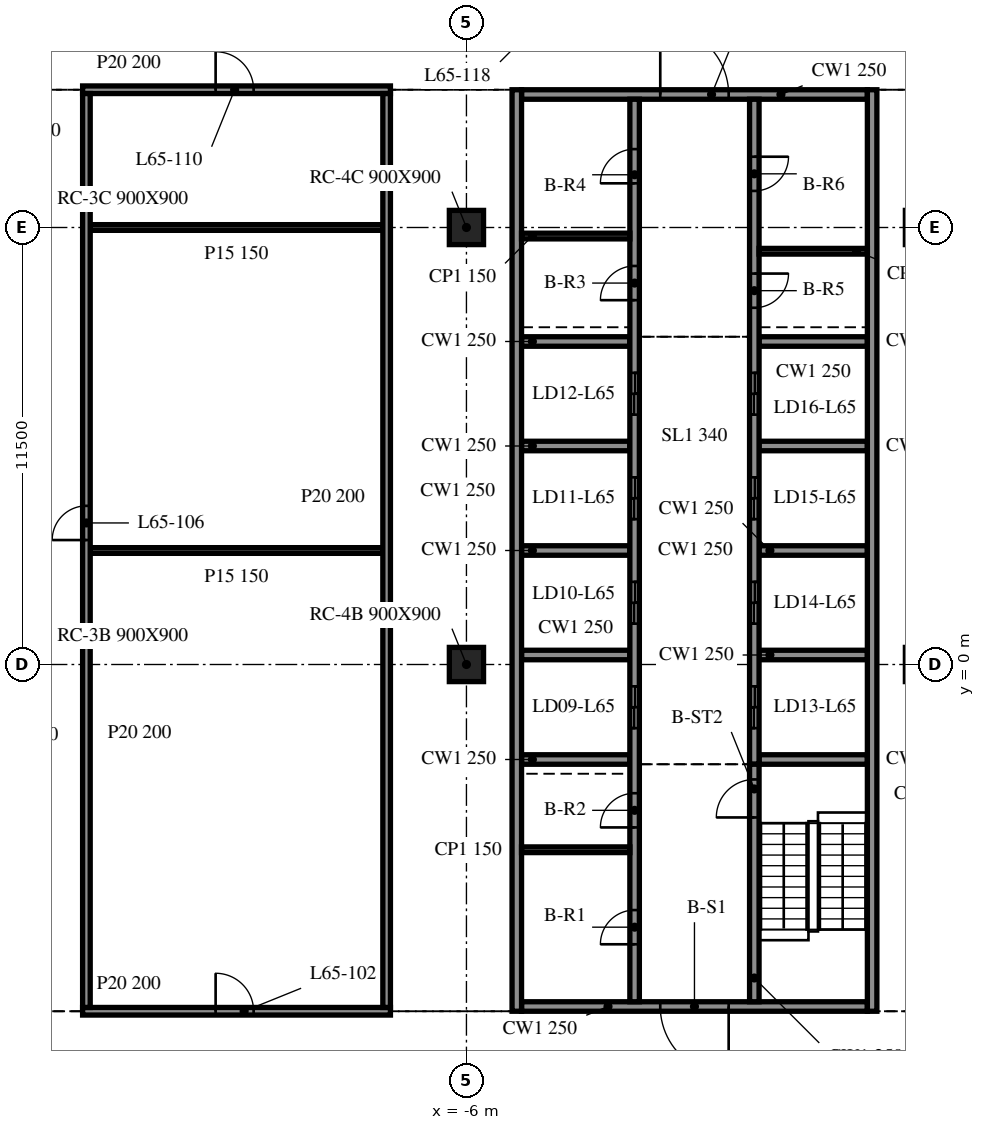
"""IFC4 building model, lengths in metres.
Left out: names, types, materials, properties, quantities, classifications, styles, units other than length and angle.
Written with IfcOpenShell. Run it as: python <this file> out.ifc"""

import sys

from ifc_helpers import new_model, si_unit, direction, frame, frame_2d, origin, origin_2d, place, context, subcontext, project, spatial, rectangle, extrude, element, fill, save


model = new_model("IFC4")
c1 = context("Model", 3, precision=1e-05, world=origin(), true_north=direction((0.0, 1.0)))
c2 = subcontext(c1, "Body", "Model", "MODEL_VIEW")
j1 = project(units=[si_unit("LENGTHUNIT", "METRE"), si_unit("PLANEANGLEUNIT", "RADIAN")], contexts=[c1])
p1 = place(None, origin())
s1 = spatial("IfcSite", under=j1, at=p1, CompositionType="ELEMENT")
p2 = place(p1, origin())
s2 = spatial("IfcBuilding", under=s1, at=p2, CompositionType="ELEMENT")
p3 = place(p2, frame((0.0, 0.0, 267.1)))
s3 = spatial("IfcBuildingStorey", under=s2, at=p3, CompositionType="ELEMENT", Elevation=267.1)
for number, where, z_axis, x_axis in (
    (1, (-6.0, 0.0, -0.34), (0.0, 0.0, 1.0), (1.0, 0.0, 0.0)),
    (2, (-6.0, 11.5, -0.34), (0.0, 0.0, 1.0), (1.0, 0.0, 0.0)),
):
    element("IfcColumn", number, at=place(p3, frame(where, z_axis=z_axis, x_axis=x_axis)), inside=s3, PredefinedType="COLUMN", context=c2, shape_type="SweptSolid", body=[
        extrude(rectangle(XDim=0.9, YDim=0.9, at=origin_2d()), origin(), (0.0, 0.0, 1.0), 3.8),
    ])
for number, where, z_axis, x_axis in (
    (3, (-4.675, 15.125, 0.0), (0.0, 0.0, 1.0), (0.0, -1.0, 0.0)),
    (4, (4.675, -9.125, 0.0), (0.0, 0.0, 1.0), (0.0, 1.0, 0.0)),
):
    element("IfcWall", number, at=place(p3, frame(where, z_axis=z_axis, x_axis=x_axis)), inside=s3, PredefinedType="SOLIDWALL", context=c2, shape_type="SweptSolid", body=[
        extrude(rectangle(XDim=24.25, YDim=0.25, at=frame_2d((12.125, 0.0))), origin(), (0.0, 0.0, 1.0), 3.46),
    ])
p4 = place(p3, frame((4.55, -9.0, 0.0), z_axis=(0.0, 0.0, 1.0), x_axis=(-1.0, 0.0, 0.0)))
e5 = element("IfcWall", 5, at=p4, inside=s3, PredefinedType="SOLIDWALL", context=c2, shape_type="SweptSolid", body=[
    extrude(rectangle(XDim=9.1, YDim=0.25, at=frame_2d((4.55, 0.0))), origin(), (0.0, 0.0, 1.0), 3.46),
])
p5 = place(p4, frame((3.65, 0.0, 0.0)))
e6 = element("IfcOpeningElement", 6, at=p5, cuts=e5, PredefinedType="OPENING", context=c2, shape_type="SweptSolid", body=[
    extrude(rectangle(XDim=1.8, YDim=2.1, at=frame_2d((0.9, 1.05))), frame((0.0, 0.135, 0.0), z_axis=(0.0, -1.0, 0.0), x_axis=(1.0, 0.0, 0.0)), (0.0, 0.0, 1.0), 0.27),
])
p6 = place(p3, frame((-4.55, 15.0, 0.0), z_axis=(0.0, 0.0, 1.0), x_axis=(1.0, 0.0, 0.0)))
e7 = element("IfcWall", 7, at=p6, inside=s3, PredefinedType="SOLIDWALL", context=c2, shape_type="SweptSolid", body=[
    extrude(rectangle(XDim=9.1, YDim=0.25, at=frame_2d((4.55, 0.0))), origin(), (0.0, 0.0, 1.0), 3.46),
])
p7 = place(p6, frame((3.65, 0.0, 0.0)))
e8 = element("IfcOpeningElement", 8, at=p7, cuts=e7, PredefinedType="OPENING", context=c2, shape_type="SweptSolid", body=[
    extrude(rectangle(XDim=1.8, YDim=2.1, at=frame_2d((0.9, 1.05))), frame((0.0, 0.135, 0.0), z_axis=(0.0, -1.0, 0.0), x_axis=(1.0, 0.0, 0.0)), (0.0, 0.0, 1.0), 0.27),
])
p8 = place(p3, frame((-1.575, -8.875, 0.0), z_axis=(0.0, 0.0, 1.0), x_axis=(0.0, 1.0, 0.0)))
e9 = element("IfcWall", 9, at=p8, inside=s3, PredefinedType="SOLIDWALL", context=c2, shape_type="SweptSolid", body=[
    extrude(rectangle(XDim=23.75, YDim=0.25, at=frame_2d((11.875, 0.0))), origin(), (0.0, 0.0, 1.0), 3.46),
])
p9 = place(p8, frame((7.2, 0.0, 0.0)))
e10 = element("IfcOpeningElement", 10, at=p9, cuts=e9, PredefinedType="OPENING", context=c2, shape_type="SweptSolid", body=[
    extrude(rectangle(XDim=1.1, YDim=2.1, at=frame_2d((0.55, 1.05))), frame((0.0, 0.135, 0.0), z_axis=(0.0, -1.0, 0.0), x_axis=(1.0, 0.0, 0.0)), (0.0, 0.0, 1.0), 0.27),
])
p10 = place(p8, frame((9.95, 0.0, 0.0)))
e11 = element("IfcOpeningElement", 11, at=p10, cuts=e9, PredefinedType="OPENING", context=c2, shape_type="SweptSolid", body=[
    extrude(rectangle(XDim=1.1, YDim=2.1, at=frame_2d((0.55, 1.05))), frame((0.0, 0.135, 0.0), z_axis=(0.0, -1.0, 0.0), x_axis=(1.0, 0.0, 0.0)), (0.0, 0.0, 1.0), 0.27),
])
p11 = place(p8, frame((12.7, 0.0, 0.0)))
e12 = element("IfcOpeningElement", 12, at=p11, cuts=e9, PredefinedType="OPENING", context=c2, shape_type="SweptSolid", body=[
    extrude(rectangle(XDim=1.1, YDim=2.1, at=frame_2d((0.55, 1.05))), frame((0.0, 0.135, 0.0), z_axis=(0.0, -1.0, 0.0), x_axis=(1.0, 0.0, 0.0)), (0.0, 0.0, 1.0), 0.27),
])
p12 = place(p8, frame((15.45, 0.0, 0.0)))
e13 = element("IfcOpeningElement", 13, at=p12, cuts=e9, PredefinedType="OPENING", context=c2, shape_type="SweptSolid", body=[
    extrude(rectangle(XDim=1.1, YDim=2.1, at=frame_2d((0.55, 1.05))), frame((0.0, 0.135, 0.0), z_axis=(0.0, -1.0, 0.0), x_axis=(1.0, 0.0, 0.0)), (0.0, 0.0, 1.0), 0.27),
])
p13 = place(p8, frame((1.512, 0.0, 0.0)))
e14 = element("IfcOpeningElement", 14, at=p13, cuts=e9, PredefinedType="OPENING", context=c2, shape_type="SweptSolid", body=[
    extrude(rectangle(XDim=0.9, YDim=2.1, at=frame_2d((0.45, 1.05))), frame((0.0, 0.135, 0.0), z_axis=(0.0, -1.0, 0.0), x_axis=(1.0, 0.0, 0.0)), (0.0, 0.0, 1.0), 0.27),
])
p14 = place(p8, frame((4.587, 0.0, 0.0)))
e15 = element("IfcOpeningElement", 15, at=p14, cuts=e9, PredefinedType="OPENING", context=c2, shape_type="SweptSolid", body=[
    extrude(rectangle(XDim=0.9, YDim=2.1, at=frame_2d((0.45, 1.05))), frame((0.0, 0.135, 0.0), z_axis=(0.0, -1.0, 0.0), x_axis=(1.0, 0.0, 0.0)), (0.0, 0.0, 1.0), 0.27),
])
p15 = place(p8, frame((18.462, 0.0, 0.0)))
e16 = element("IfcOpeningElement", 16, at=p15, cuts=e9, PredefinedType="OPENING", context=c2, shape_type="SweptSolid", body=[
    extrude(rectangle(XDim=0.9, YDim=2.1, at=frame_2d((0.45, 1.05))), frame((0.0, 0.135, 0.0), z_axis=(0.0, -1.0, 0.0), x_axis=(1.0, 0.0, 0.0)), (0.0, 0.0, 1.0), 0.27),
])
p16 = place(p8, frame((21.538, 0.0, 0.0)))
e17 = element("IfcOpeningElement", 17, at=p16, cuts=e9, PredefinedType="OPENING", context=c2, shape_type="SweptSolid", body=[
    extrude(rectangle(XDim=0.9, YDim=2.1, at=frame_2d((0.45, 1.05))), frame((0.0, 0.135, 0.0), z_axis=(0.0, -1.0, 0.0), x_axis=(1.0, 0.0, 0.0)), (0.0, 0.0, 1.0), 0.27),
])
p17 = place(p3, frame((1.575, -8.875, 0.0), z_axis=(0.0, 0.0, 1.0), x_axis=(0.0, 1.0, 0.0)))
e18 = element("IfcWall", 18, at=p17, inside=s3, PredefinedType="SOLIDWALL", context=c2, shape_type="SweptSolid", body=[
    extrude(rectangle(XDim=6.25, YDim=0.25, at=frame_2d((3.125, 0.0))), origin(), (0.0, 0.0, 1.0), 3.46),
])
p18 = place(p17, frame((4.85, 0.0, 0.0)))
e19 = element("IfcOpeningElement", 19, at=p18, cuts=e18, PredefinedType="OPENING", context=c2, shape_type="SweptSolid", body=[
    extrude(rectangle(XDim=1.0, YDim=2.1, at=frame_2d((0.5, 1.05))), frame((0.0, 0.135, 0.0), z_axis=(0.0, -1.0, 0.0), x_axis=(1.0, 0.0, 0.0)), (0.0, 0.0, 1.0), 0.27),
])
p19 = place(p3, frame((1.575, 14.875, 0.0), z_axis=(0.0, 0.0, 1.0), x_axis=(0.0, -1.0, 0.0)))
e20 = element("IfcWall", 20, at=p19, inside=s3, PredefinedType="SOLIDWALL", context=c2, shape_type="SweptSolid", body=[
    extrude(rectangle(XDim=17.5, YDim=0.25, at=frame_2d((8.75, 0.0))), origin(), (0.0, 0.0, 1.0), 3.46),
])
p20 = place(p19, frame((15.45, 0.0, 0.0)))
e21 = element("IfcOpeningElement", 21, at=p20, cuts=e20, PredefinedType="OPENING", context=c2, shape_type="SweptSolid", body=[
    extrude(rectangle(XDim=1.1, YDim=2.1, at=frame_2d((0.55, 1.05))), frame((0.0, 0.135, 0.0), z_axis=(0.0, -1.0, 0.0), x_axis=(1.0, 0.0, 0.0)), (0.0, 0.0, 1.0), 0.27),
])
p21 = place(p19, frame((12.7, 0.0, 0.0)))
e22 = element("IfcOpeningElement", 22, at=p21, cuts=e20, PredefinedType="OPENING", context=c2, shape_type="SweptSolid", body=[
    extrude(rectangle(XDim=1.1, YDim=2.1, at=frame_2d((0.55, 1.05))), frame((0.0, 0.135, 0.0), z_axis=(0.0, -1.0, 0.0), x_axis=(1.0, 0.0, 0.0)), (0.0, 0.0, 1.0), 0.27),
])
p22 = place(p19, frame((9.95, 0.0, 0.0)))
e23 = element("IfcOpeningElement", 23, at=p22, cuts=e20, PredefinedType="OPENING", context=c2, shape_type="SweptSolid", body=[
    extrude(rectangle(XDim=1.1, YDim=2.1, at=frame_2d((0.55, 1.05))), frame((0.0, 0.135, 0.0), z_axis=(0.0, -1.0, 0.0), x_axis=(1.0, 0.0, 0.0)), (0.0, 0.0, 1.0), 0.27),
])
p23 = place(p19, frame((7.2, 0.0, 0.0)))
e24 = element("IfcOpeningElement", 24, at=p23, cuts=e20, PredefinedType="OPENING", context=c2, shape_type="SweptSolid", body=[
    extrude(rectangle(XDim=1.1, YDim=2.1, at=frame_2d((0.55, 1.05))), frame((0.0, 0.135, 0.0), z_axis=(0.0, -1.0, 0.0), x_axis=(1.0, 0.0, 0.0)), (0.0, 0.0, 1.0), 0.27),
])
p24 = place(p19, frame((4.587, 0.0, 0.0)))
e25 = element("IfcOpeningElement", 25, at=p24, cuts=e20, PredefinedType="OPENING", context=c2, shape_type="SweptSolid", body=[
    extrude(rectangle(XDim=0.9, YDim=2.1, at=frame_2d((0.45, 1.05))), frame((0.0, 0.135, 0.0), z_axis=(0.0, -1.0, 0.0), x_axis=(1.0, 0.0, 0.0)), (0.0, 0.0, 1.0), 0.27),
])
p25 = place(p19, frame((1.512, 0.0, 0.0)))
e26 = element("IfcOpeningElement", 26, at=p25, cuts=e20, PredefinedType="OPENING", context=c2, shape_type="SweptSolid", body=[
    extrude(rectangle(XDim=0.9, YDim=2.1, at=frame_2d((0.45, 1.05))), frame((0.0, 0.135, 0.0), z_axis=(0.0, -1.0, 0.0), x_axis=(1.0, 0.0, 0.0)), (0.0, 0.0, 1.0), 0.27),
])
for number, where, z_axis, x_axis in (
    (27, (-4.55, -2.5, 0.0), (0.0, 0.0, 1.0), (1.0, 0.0, 0.0)),
    (28, (-4.55, 0.25, 0.0), (0.0, 0.0, 1.0), (1.0, 0.0, 0.0)),
    (29, (-4.55, 3.0, 0.0), (0.0, 0.0, 1.0), (1.0, 0.0, 0.0)),
    (30, (-4.55, 5.75, 0.0), (0.0, 0.0, 1.0), (1.0, 0.0, 0.0)),
    (31, (-4.55, 8.5, 0.0), (0.0, 0.0, 1.0), (1.0, 0.0, 0.0)),
    (32, (1.7, -2.5, 0.0), (0.0, 0.0, 1.0), (1.0, 0.0, 0.0)),
    (33, (1.7, 0.25, 0.0), (0.0, 0.0, 1.0), (1.0, 0.0, 0.0)),
    (34, (1.7, 3.0, 0.0), (0.0, 0.0, 1.0), (1.0, 0.0, 0.0)),
    (35, (1.7, 5.75, 0.0), (0.0, 0.0, 1.0), (1.0, 0.0, 0.0)),
    (36, (1.7, 8.5, 0.0), (0.0, 0.0, 1.0), (1.0, 0.0, 0.0)),
):
    element("IfcWall", number, at=place(p3, frame(where, z_axis=z_axis, x_axis=x_axis)), inside=s3, PredefinedType="SOLIDWALL", context=c2, shape_type="SweptSolid", body=[
        extrude(rectangle(XDim=2.85, YDim=0.25, at=frame_2d((1.425, 0.0))), origin(), (0.0, 0.0, 1.0), 3.46),
    ])
for number, where, z_axis, x_axis in (
    (37, (-4.55, -4.875, 0.0), (0.0, 0.0, 1.0), (1.0, 0.0, 0.0)),
    (38, (-4.55, 11.275, 0.0), (0.0, 0.0, 1.0), (1.0, 0.0, 0.0)),
    (39, (1.7, 10.875, 0.0), (0.0, 0.0, 1.0), (1.0, 0.0, 0.0)),
):
    element("IfcWall", number, at=place(p3, frame(where, z_axis=z_axis, x_axis=x_axis)), inside=s3, PredefinedType="PARTITIONING", context=c2, shape_type="SweptSolid", body=[
        extrude(rectangle(XDim=2.85, YDim=0.15, at=frame_2d((1.425, 0.0))), origin(), (0.0, 0.0, 1.0), 3.46),
    ])
p26 = place(p3, frame((-16.1, -9.125, 0.0), z_axis=(0.0, 0.0, 1.0), x_axis=(1.0, 0.0, 0.0)))
e40 = element("IfcWall", 40, at=p26, inside=s3, PredefinedType="PARTITIONING", context=c2, shape_type="SweptSolid", body=[
    extrude(rectangle(XDim=8.1, YDim=0.2, at=frame_2d((4.05, 0.0))), origin(), (0.0, 0.0, 1.0), 3.46),
])
p27 = place(p26, frame((3.5, 0.0, 0.0)))
e41 = element("IfcOpeningElement", 41, at=p27, cuts=e40, PredefinedType="OPENING", context=c2, shape_type="SweptSolid", body=[
    extrude(rectangle(XDim=1.0, YDim=2.1, at=frame_2d((0.5, 1.05))), frame((0.0, 0.11, 0.0), z_axis=(0.0, -1.0, 0.0), x_axis=(1.0, 0.0, 0.0)), (0.0, 0.0, 1.0), 0.22),
])
for number, where, z_axis, x_axis in (
    (42, (-15.9, 3.0, 0.0), (0.0, 0.0, 1.0), (1.0, 0.0, 0.0)),
    (43, (-15.9, 11.5, 0.0), (0.0, 0.0, 1.0), (1.0, 0.0, 0.0)),
):
    element("IfcWall", number, at=place(p3, frame(where, z_axis=z_axis, x_axis=x_axis)), inside=s3, PredefinedType="PARTITIONING", context=c2, shape_type="SweptSolid", body=[
        extrude(rectangle(XDim=7.7, YDim=0.15, at=frame_2d((3.85, 0.0))), origin(), (0.0, 0.0, 1.0), 3.46),
    ])
p28 = place(p3, frame((-16.1, 15.125, 0.0), z_axis=(0.0, 0.0, 1.0), x_axis=(1.0, 0.0, 0.0)))
e44 = element("IfcWall", 44, at=p28, inside=s3, PredefinedType="PARTITIONING", context=c2, shape_type="SweptSolid", body=[
    extrude(rectangle(XDim=8.1, YDim=0.2, at=frame_2d((4.05, 0.0))), origin(), (0.0, 0.0, 1.0), 3.46),
])
p29 = place(p28, frame((3.5, 0.0, 0.0)))
e45 = element("IfcOpeningElement", 45, at=p29, cuts=e44, PredefinedType="OPENING", context=c2, shape_type="SweptSolid", body=[
    extrude(rectangle(XDim=1.0, YDim=2.1, at=frame_2d((0.5, 1.05))), frame((0.0, 0.11, 0.0), z_axis=(0.0, -1.0, 0.0), x_axis=(1.0, 0.0, 0.0)), (0.0, 0.0, 1.0), 0.22),
])
p30 = place(p3, frame((-16.0, -9.025, 0.0), z_axis=(0.0, 0.0, 1.0), x_axis=(0.0, 1.0, 0.0)))
e46 = element("IfcWall", 46, at=p30, inside=s3, PredefinedType="PARTITIONING", context=c2, shape_type="SweptSolid", body=[
    extrude(rectangle(XDim=24.05, YDim=0.2, at=frame_2d((12.025, 0.0))), origin(), (0.0, 0.0, 1.0), 3.46),
])
p31 = place(p30, frame((12.3, 0.0, 0.0)))
e47 = element("IfcOpeningElement", 47, at=p31, cuts=e46, PredefinedType="OPENING", context=c2, shape_type="SweptSolid", body=[
    extrude(rectangle(XDim=0.9, YDim=2.1, at=frame_2d((0.45, 1.05))), frame((0.0, 0.11, 0.0), z_axis=(0.0, -1.0, 0.0), x_axis=(1.0, 0.0, 0.0)), (0.0, 0.0, 1.0), 0.22),
])
p32 = place(p3, frame((-8.1, -9.025, 0.0), z_axis=(0.0, 0.0, 1.0), x_axis=(0.0, 1.0, 0.0)))
e48 = element("IfcWall", 48, at=p32, inside=s3, PredefinedType="PARTITIONING", context=c2, shape_type="SweptSolid", body=[
    extrude(rectangle(XDim=24.05, YDim=0.2, at=frame_2d((12.025, 0.0))), origin(), (0.0, 0.0, 1.0), 3.46),
])
p33 = place(p5, origin())
e49 = element("IfcDoor", 49, at=p33, inside=s3, OperationType="DOUBLE_DOOR_SINGLE_SWING", PredefinedType="DOOR", context=c2, shape_type="SweptSolid", body=[
    extrude(rectangle(XDim=1.8, YDim=2.1, at=frame_2d((0.9, 1.05))), frame((0.0, 0.025, 0.0), z_axis=(0.0, -1.0, 0.0), x_axis=(1.0, 0.0, 0.0)), (0.0, 0.0, 1.0), 0.05),
])
fill(e6, e49)
p34 = place(p7, origin())
e50 = element("IfcDoor", 50, at=p34, inside=s3, OperationType="DOUBLE_DOOR_SINGLE_SWING", PredefinedType="DOOR", context=c2, shape_type="SweptSolid", body=[
    extrude(rectangle(XDim=1.8, YDim=2.1, at=frame_2d((0.9, 1.05))), frame((0.0, 0.025, 0.0), z_axis=(0.0, -1.0, 0.0), x_axis=(1.0, 0.0, 0.0)), (0.0, 0.0, 1.0), 0.05),
])
fill(e8, e50)
p35 = place(p20, origin())
e51 = element("IfcDoor", 51, at=p35, inside=s3, OperationType="DOUBLE_DOOR_SLIDING", PredefinedType="DOOR", context=c2, shape_type="SweptSolid", body=[
    extrude(rectangle(XDim=1.1, YDim=2.1, at=frame_2d((0.55, 1.05))), frame((0.0, 0.025, 0.0), z_axis=(0.0, -1.0, 0.0), x_axis=(1.0, 0.0, 0.0)), (0.0, 0.0, 1.0), 0.05),
])
fill(e21, e51)
p36 = place(p21, origin())
e52 = element("IfcDoor", 52, at=p36, inside=s3, OperationType="DOUBLE_DOOR_SLIDING", PredefinedType="DOOR", context=c2, shape_type="SweptSolid", body=[
    extrude(rectangle(XDim=1.1, YDim=2.1, at=frame_2d((0.55, 1.05))), frame((0.0, 0.025, 0.0), z_axis=(0.0, -1.0, 0.0), x_axis=(1.0, 0.0, 0.0)), (0.0, 0.0, 1.0), 0.05),
])
fill(e22, e52)
p37 = place(p22, origin())
e53 = element("IfcDoor", 53, at=p37, inside=s3, OperationType="DOUBLE_DOOR_SLIDING", PredefinedType="DOOR", context=c2, shape_type="SweptSolid", body=[
    extrude(rectangle(XDim=1.1, YDim=2.1, at=frame_2d((0.55, 1.05))), frame((0.0, 0.025, 0.0), z_axis=(0.0, -1.0, 0.0), x_axis=(1.0, 0.0, 0.0)), (0.0, 0.0, 1.0), 0.05),
])
fill(e23, e53)
p38 = place(p23, origin())
e54 = element("IfcDoor", 54, at=p38, inside=s3, OperationType="DOUBLE_DOOR_SLIDING", PredefinedType="DOOR", context=c2, shape_type="SweptSolid", body=[
    extrude(rectangle(XDim=1.1, YDim=2.1, at=frame_2d((0.55, 1.05))), frame((0.0, 0.025, 0.0), z_axis=(0.0, -1.0, 0.0), x_axis=(1.0, 0.0, 0.0)), (0.0, 0.0, 1.0), 0.05),
])
fill(e24, e54)
p39 = place(p9, origin())
e55 = element("IfcDoor", 55, at=p39, inside=s3, OperationType="DOUBLE_DOOR_SLIDING", PredefinedType="DOOR", context=c2, shape_type="SweptSolid", body=[
    extrude(rectangle(XDim=1.1, YDim=2.1, at=frame_2d((0.55, 1.05))), frame((0.0, 0.025, 0.0), z_axis=(0.0, -1.0, 0.0), x_axis=(1.0, 0.0, 0.0)), (0.0, 0.0, 1.0), 0.05),
])
fill(e10, e55)
p40 = place(p10, origin())
e56 = element("IfcDoor", 56, at=p40, inside=s3, OperationType="DOUBLE_DOOR_SLIDING", PredefinedType="DOOR", context=c2, shape_type="SweptSolid", body=[
    extrude(rectangle(XDim=1.1, YDim=2.1, at=frame_2d((0.55, 1.05))), frame((0.0, 0.025, 0.0), z_axis=(0.0, -1.0, 0.0), x_axis=(1.0, 0.0, 0.0)), (0.0, 0.0, 1.0), 0.05),
])
fill(e11, e56)
p41 = place(p11, origin())
e57 = element("IfcDoor", 57, at=p41, inside=s3, OperationType="DOUBLE_DOOR_SLIDING", PredefinedType="DOOR", context=c2, shape_type="SweptSolid", body=[
    extrude(rectangle(XDim=1.1, YDim=2.1, at=frame_2d((0.55, 1.05))), frame((0.0, 0.025, 0.0), z_axis=(0.0, -1.0, 0.0), x_axis=(1.0, 0.0, 0.0)), (0.0, 0.0, 1.0), 0.05),
])
fill(e12, e57)
p42 = place(p12, origin())
e58 = element("IfcDoor", 58, at=p42, inside=s3, OperationType="DOUBLE_DOOR_SLIDING", PredefinedType="DOOR", context=c2, shape_type="SweptSolid", body=[
    extrude(rectangle(XDim=1.1, YDim=2.1, at=frame_2d((0.55, 1.05))), frame((0.0, 0.025, 0.0), z_axis=(0.0, -1.0, 0.0), x_axis=(1.0, 0.0, 0.0)), (0.0, 0.0, 1.0), 0.05),
])
fill(e13, e58)
p43 = place(p13, origin())
e59 = element("IfcDoor", 59, at=p43, inside=s3, OperationType="SINGLE_SWING_LEFT", PredefinedType="DOOR", context=c2, shape_type="SweptSolid", body=[
    extrude(rectangle(XDim=0.9, YDim=2.1, at=frame_2d((0.45, 1.05))), frame((0.0, 0.025, 0.0), z_axis=(0.0, -1.0, 0.0), x_axis=(1.0, 0.0, 0.0)), (0.0, 0.0, 1.0), 0.05),
])
fill(e14, e59)
p44 = place(p14, origin())
e60 = element("IfcDoor", 60, at=p44, inside=s3, OperationType="SINGLE_SWING_RIGHT", PredefinedType="DOOR", context=c2, shape_type="SweptSolid", body=[
    extrude(rectangle(XDim=0.9, YDim=2.1, at=frame_2d((0.45, 1.05))), frame((0.0, 0.025, 0.0), z_axis=(0.0, -1.0, 0.0), x_axis=(1.0, 0.0, 0.0)), (0.0, 0.0, 1.0), 0.05),
])
fill(e15, e60)
p45 = place(p15, origin())
e61 = element("IfcDoor", 61, at=p45, inside=s3, OperationType="SINGLE_SWING_LEFT", PredefinedType="DOOR", context=c2, shape_type="SweptSolid", body=[
    extrude(rectangle(XDim=0.9, YDim=2.1, at=frame_2d((0.45, 1.05))), frame((0.0, 0.025, 0.0), z_axis=(0.0, -1.0, 0.0), x_axis=(1.0, 0.0, 0.0)), (0.0, 0.0, 1.0), 0.05),
])
fill(e16, e61)
p46 = place(p16, origin())
e62 = element("IfcDoor", 62, at=p46, inside=s3, OperationType="SINGLE_SWING_RIGHT", PredefinedType="DOOR", context=c2, shape_type="SweptSolid", body=[
    extrude(rectangle(XDim=0.9, YDim=2.1, at=frame_2d((0.45, 1.05))), frame((0.0, 0.025, 0.0), z_axis=(0.0, -1.0, 0.0), x_axis=(1.0, 0.0, 0.0)), (0.0, 0.0, 1.0), 0.05),
])
fill(e17, e62)
p47 = place(p24, origin())
e63 = element("IfcDoor", 63, at=p47, inside=s3, OperationType="SINGLE_SWING_LEFT", PredefinedType="DOOR", context=c2, shape_type="SweptSolid", body=[
    extrude(rectangle(XDim=0.9, YDim=2.1, at=frame_2d((0.45, 1.05))), frame((0.0, 0.025, 0.0), z_axis=(0.0, -1.0, 0.0), x_axis=(1.0, 0.0, 0.0)), (0.0, 0.0, 1.0), 0.05),
])
fill(e25, e63)
p48 = place(p25, origin())
e64 = element("IfcDoor", 64, at=p48, inside=s3, OperationType="SINGLE_SWING_RIGHT", PredefinedType="DOOR", context=c2, shape_type="SweptSolid", body=[
    extrude(rectangle(XDim=0.9, YDim=2.1, at=frame_2d((0.45, 1.05))), frame((0.0, 0.025, 0.0), z_axis=(0.0, -1.0, 0.0), x_axis=(1.0, 0.0, 0.0)), (0.0, 0.0, 1.0), 0.05),
])
fill(e26, e64)
p49 = place(p18, origin())
e65 = element("IfcDoor", 65, at=p49, inside=s3, OperationType="SINGLE_SWING_LEFT", PredefinedType="DOOR", context=c2, shape_type="SweptSolid", body=[
    extrude(rectangle(XDim=1.0, YDim=2.1, at=frame_2d((0.5, 1.05))), frame((0.0, 0.025, 0.0), z_axis=(0.0, -1.0, 0.0), x_axis=(1.0, 0.0, 0.0)), (0.0, 0.0, 1.0), 0.05),
])
fill(e19, e65)
p50 = place(p27, origin())
e66 = element("IfcDoor", 66, at=p50, inside=s3, OperationType="SINGLE_SWING_LEFT", PredefinedType="DOOR", context=c2, shape_type="SweptSolid", body=[
    extrude(rectangle(XDim=1.0, YDim=2.1, at=frame_2d((0.5, 1.05))), frame((0.0, 0.025, 0.0), z_axis=(0.0, -1.0, 0.0), x_axis=(1.0, 0.0, 0.0)), (0.0, 0.0, 1.0), 0.05),
])
fill(e41, e66)
p51 = place(p31, origin())
e67 = element("IfcDoor", 67, at=p51, inside=s3, OperationType="SINGLE_SWING_LEFT", PredefinedType="DOOR", context=c2, shape_type="SweptSolid", body=[
    extrude(rectangle(XDim=0.9, YDim=2.1, at=frame_2d((0.45, 1.05))), frame((0.0, 0.025, 0.0), z_axis=(0.0, -1.0, 0.0), x_axis=(1.0, 0.0, 0.0)), (0.0, 0.0, 1.0), 0.05),
])
fill(e47, e67)
p52 = place(p29, origin())
e68 = element("IfcDoor", 68, at=p52, inside=s3, OperationType="SINGLE_SWING_RIGHT", PredefinedType="DOOR", context=c2, shape_type="SweptSolid", body=[
    extrude(rectangle(XDim=1.0, YDim=2.1, at=frame_2d((0.5, 1.05))), frame((0.0, 0.025, 0.0), z_axis=(0.0, -1.0, 0.0), x_axis=(1.0, 0.0, 0.0)), (0.0, 0.0, 1.0), 0.05),
])
fill(e45, e68)
save(model, sys.argv[1])
